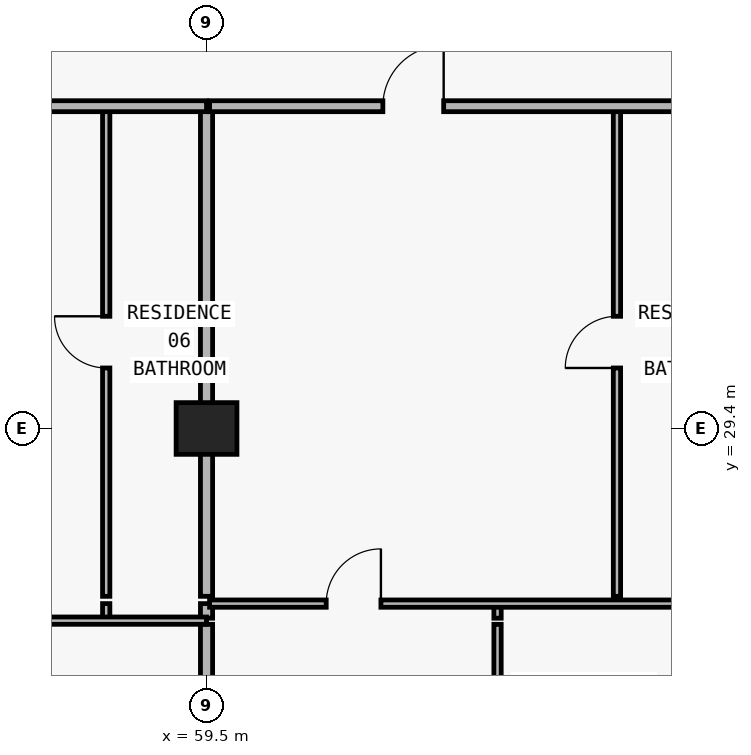
"""IFC4 building model, lengths in metres.
Left out: names, types, materials, properties, quantities, classifications, styles, units other than length and angle.
Written with IfcOpenShell. Run it as: python <this file> out.ifc"""

import sys

from ifc_helpers import new_model, si_unit, direction, frame, frame_2d, origin, origin_2d, place, context, subcontext, project, spatial, rectangle, extrude, element, fill, save


model = new_model("IFC4")
c1 = context("Model", 3, precision=1e-05, world=origin(), true_north=direction((0.0, 1.0)))
c2 = subcontext(c1, "Body", "Model", "MODEL_VIEW")
j1 = project(units=[si_unit("LENGTHUNIT", "METRE"), si_unit("PLANEANGLEUNIT", "RADIAN")], contexts=[c1])
p1 = place(None, origin())
s1 = spatial("IfcSite", under=j1, at=p1, CompositionType="ELEMENT")
p2 = place(p1, origin())
s2 = spatial("IfcBuilding", under=s1, at=p2, CompositionType="ELEMENT")
p3 = place(p2, frame((0.0, 0.0, 122.4)))
s3 = spatial("IfcBuildingStorey", under=s2, at=p3, CompositionType="ELEMENT", Elevation=122.4)
p4 = place(p3, frame((59.5, 29.4, 0.0), z_axis=(0.0, 0.0, 1.0), x_axis=(1.0, 0.0, 0.0)))
e1 = element("IfcColumn", 1, at=p4, inside=s3, PredefinedType="COLUMN", context=c2, shape_type="SweptSolid", body=[
    extrude(rectangle(XDim=1.0, YDim=0.85, at=origin_2d()), origin(), (0.0, 0.0, 1.0), 3.05),
])
p5 = place(p3, frame((57.85, 26.28, 0.0), z_axis=(0.0, 0.0, 1.0), x_axis=(0.0, 1.0, 0.0)))
e2 = element("IfcWall", 2, at=p5, inside=s3, PredefinedType="PARTITIONING", context=c2, shape_type="SweptSolid", body=[
    extrude(rectangle(XDim=0.24, YDim=0.12, at=frame_2d((0.12, 0.0))), origin(), (0.0, 0.0, 1.0), 3.05),
])
p6 = place(p3, frame((57.85, 26.64, 0.0), z_axis=(0.0, 0.0, 1.0), x_axis=(0.0, 1.0, 0.0)))
e3 = element("IfcWall", 3, at=p6, inside=s3, PredefinedType="PARTITIONING", context=c2, shape_type="SweptSolid", body=[
    extrude(rectangle(XDim=8.06, YDim=0.12, at=frame_2d((4.03, 0.0))), origin(), (0.0, 0.0, 1.0), 3.05),
])
p7 = place(p6, frame((3.755, 0.0, 0.0)))
e4 = element("IfcOpeningElement", 4, at=p7, cuts=e3, PredefinedType="OPENING", context=c2, shape_type="SweptSolid", body=[
    extrude(rectangle(XDim=0.85, YDim=2.1, at=frame_2d((0.425, 1.05))), frame((0.0, 0.07, 0.0), z_axis=(0.0, -1.0, 0.0), x_axis=(1.0, 0.0, 0.0)), (0.0, 0.0, 1.0), 0.14),
])
p8 = place(p3, frame((59.5, 21.49, 0.0), z_axis=(0.0, 0.0, 1.0), x_axis=(0.0, 1.0, 0.0)))
e5 = element("IfcWall", 5, at=p8, inside=s3, PredefinedType="PARTITIONING", context=c2, shape_type="SweptSolid", body=[
    extrude(rectangle(XDim=4.69, YDim=0.2, at=frame_2d((2.345, 0.0))), origin(), (0.0, 0.0, 1.0), 2.174),
])
p9 = place(p3, frame((59.5, 26.28, 0.0), z_axis=(0.0, 0.0, 1.0), x_axis=(0.0, 1.0, 0.0)))
e6 = element("IfcWall", 6, at=p9, inside=s3, PredefinedType="PARTITIONING", context=c2, shape_type="SweptSolid", body=[
    extrude(rectangle(XDim=0.24, YDim=0.2, at=frame_2d((0.12, 0.0))), origin(), (0.0, 0.0, 1.0), 2.174),
])
p10 = place(p3, frame((59.5, 26.64, 0.0), z_axis=(0.0, 0.0, 1.0), x_axis=(0.0, 1.0, 0.0)))
e7 = element("IfcWall", 7, at=p10, inside=s3, PredefinedType="PARTITIONING", context=c2, shape_type="SweptSolid", body=[
    extrude(rectangle(XDim=8.06, YDim=0.2, at=frame_2d((4.03, 0.0))), origin(), (0.0, 0.0, 1.0), 2.174),
])
p11 = place(p3, frame((64.286, 21.49, 0.0), z_axis=(0.0, 0.0, 1.0), x_axis=(0.0, 1.0, 0.0)))
e8 = element("IfcWall", 8, at=p11, inside=s3, PredefinedType="PARTITIONING", context=c2, shape_type="SweptSolid", body=[
    extrude(rectangle(XDim=4.69, YDim=0.12, at=frame_2d((2.345, 0.0))), origin(), (0.0, 0.0, 1.0), 3.05),
])
p12 = place(p11, frame((1.895, 0.0, 0.0)))
e9 = element("IfcOpeningElement", 9, at=p12, cuts=e8, PredefinedType="OPENING", context=c2, shape_type="SweptSolid", body=[
    extrude(rectangle(XDim=0.9, YDim=2.15, at=frame_2d((0.45, 1.075))), frame((0.0, 0.07, 0.0), z_axis=(0.0, -1.0, 0.0), x_axis=(1.0, 0.0, 0.0)), (0.0, 0.0, 1.0), 0.14),
])
p13 = place(p3, frame((64.286, 26.28, 0.0), z_axis=(0.0, 0.0, 1.0), x_axis=(0.0, 1.0, 0.0)))
e10 = element("IfcWall", 10, at=p13, inside=s3, PredefinedType="PARTITIONING", context=c2, shape_type="SweptSolid", body=[
    extrude(rectangle(XDim=0.24, YDim=0.12, at=frame_2d((0.12, 0.0))), origin(), (0.0, 0.0, 1.0), 3.05),
])
p14 = place(p3, frame((66.25, 26.64, 0.0), z_axis=(0.0, 0.0, 1.0), x_axis=(0.0, 1.0, 0.0)))
e11 = element("IfcWall", 11, at=p14, inside=s3, PredefinedType="PARTITIONING", context=c2, shape_type="SweptSolid", body=[
    extrude(rectangle(XDim=8.06, YDim=0.12, at=frame_2d((4.03, 0.0))), origin(), (0.0, 0.0, 1.0), 3.05),
])
p15 = place(p14, frame((3.755, 0.0, 0.0)))
e12 = element("IfcOpeningElement", 12, at=p15, cuts=e11, PredefinedType="OPENING", context=c2, shape_type="SweptSolid", body=[
    extrude(rectangle(XDim=0.85, YDim=2.1, at=frame_2d((0.425, 1.05))), frame((0.0, 0.07, 0.0), z_axis=(0.0, -1.0, 0.0), x_axis=(1.0, 0.0, 0.0)), (0.0, 0.0, 1.0), 0.14),
])
p16 = place(p3, frame((51.32, 26.24, 0.0), z_axis=(0.0, 0.0, 1.0), x_axis=(1.0, 0.0, 0.0)))
e13 = element("IfcWall", 13, at=p16, inside=s3, PredefinedType="PARTITIONING", context=c2, shape_type="SweptSolid", body=[
    extrude(rectangle(XDim=8.18, YDim=0.12, at=frame_2d((4.09, 0.0))), origin(), (0.0, 0.0, 1.0), 3.05),
])
p17 = place(p16, frame((1.708, 0.0, 0.0)))
e14 = element("IfcOpeningElement", 14, at=p17, cuts=e13, PredefinedType="OPENING", context=c2, shape_type="SweptSolid", body=[
    extrude(rectangle(XDim=0.9, YDim=2.15, at=frame_2d((0.45, 1.075))), frame((0.0, 0.07, 0.0), z_axis=(0.0, -1.0, 0.0), x_axis=(1.0, 0.0, 0.0)), (0.0, 0.0, 1.0), 0.14),
])
p18 = place(p3, frame((59.55, 26.52, 0.0), z_axis=(0.0, 0.0, 1.0), x_axis=(1.0, 0.0, 0.0)))
e15 = element("IfcWall", 15, at=p18, inside=s3, PredefinedType="PARTITIONING", context=c2, shape_type="SweptSolid", body=[
    extrude(rectangle(XDim=8.35, YDim=0.12, at=frame_2d((4.175, 0.0))), origin(), (0.0, 0.0, 1.0), 3.05),
])
p19 = place(p18, frame((1.918, 0.0, 0.0)))
e16 = element("IfcOpeningElement", 16, at=p19, cuts=e15, PredefinedType="OPENING", context=c2, shape_type="SweptSolid", body=[
    extrude(rectangle(XDim=0.9, YDim=2.15, at=frame_2d((0.45, 1.075))), frame((0.0, 0.07, 0.0), z_axis=(0.0, -1.0, 0.0), x_axis=(1.0, 0.0, 0.0)), (0.0, 0.0, 1.0), 0.14),
])
p20 = place(p3, frame((18.3, 34.7, 0.0), z_axis=(0.0, 0.0, 1.0), x_axis=(1.0, 0.0, 0.0)))
e17 = element("IfcWall", 17, at=p20, inside=s3, PredefinedType="PARTITIONING", context=c2, shape_type="SweptSolid", body=[
    extrude(rectangle(XDim=41.2, YDim=0.18, at=frame_2d((20.6, 0.0))), origin(), (0.0, 0.0, 1.0), 3.05),
])
p21 = place(p20, frame((2.875, 0.0, 0.0)))
e18 = element("IfcOpeningElement", 18, at=p21, cuts=e17, PredefinedType="OPENING", context=c2, shape_type="SweptSolid", body=[
    extrude(rectangle(XDim=1.0, YDim=2.2, at=frame_2d((0.5, 1.1))), frame((0.0, 0.1, 0.0), z_axis=(0.0, -1.0, 0.0), x_axis=(1.0, 0.0, 0.0)), (0.0, 0.0, 1.0), 0.2),
])
p22 = place(p20, frame((11.275, 0.0, 0.0)))
e19 = element("IfcOpeningElement", 19, at=p22, cuts=e17, PredefinedType="OPENING", context=c2, shape_type="SweptSolid", body=[
    extrude(rectangle(XDim=1.0, YDim=2.2, at=frame_2d((0.5, 1.1))), frame((0.0, 0.1, 0.0), z_axis=(0.0, -1.0, 0.0), x_axis=(1.0, 0.0, 0.0)), (0.0, 0.0, 1.0), 0.2),
])
p23 = place(p20, frame((19.275, 0.0, 0.0)))
e20 = element("IfcOpeningElement", 20, at=p23, cuts=e17, PredefinedType="OPENING", context=c2, shape_type="SweptSolid", body=[
    extrude(rectangle(XDim=1.0, YDim=2.2, at=frame_2d((0.5, 1.1))), frame((0.0, 0.1, 0.0), z_axis=(0.0, -1.0, 0.0), x_axis=(1.0, 0.0, 0.0)), (0.0, 0.0, 1.0), 0.2),
])
p24 = place(p20, frame((27.275, 0.0, 0.0)))
e21 = element("IfcOpeningElement", 21, at=p24, cuts=e17, PredefinedType="OPENING", context=c2, shape_type="SweptSolid", body=[
    extrude(rectangle(XDim=1.0, YDim=2.2, at=frame_2d((0.5, 1.1))), frame((0.0, 0.1, 0.0), z_axis=(0.0, -1.0, 0.0), x_axis=(1.0, 0.0, 0.0)), (0.0, 0.0, 1.0), 0.2),
])
p25 = place(p20, frame((35.675, 0.0, 0.0)))
e22 = element("IfcOpeningElement", 22, at=p25, cuts=e17, PredefinedType="OPENING", context=c2, shape_type="SweptSolid", body=[
    extrude(rectangle(XDim=1.0, YDim=2.2, at=frame_2d((0.5, 1.1))), frame((0.0, 0.1, 0.0), z_axis=(0.0, -1.0, 0.0), x_axis=(1.0, 0.0, 0.0)), (0.0, 0.0, 1.0), 0.2),
])
p26 = place(p3, frame((59.55, 34.7, 0.0), z_axis=(0.0, 0.0, 1.0), x_axis=(1.0, 0.0, 0.0)))
e23 = element("IfcWall", 23, at=p26, inside=s3, PredefinedType="PARTITIONING", context=c2, shape_type="SweptSolid", body=[
    extrude(rectangle(XDim=10.55, YDim=0.18, at=frame_2d((5.275, 0.0))), origin(), (0.0, 0.0, 1.0), 3.05),
])
p27 = place(p26, frame((2.85, 0.0, 0.0)))
e24 = element("IfcOpeningElement", 24, at=p27, cuts=e23, PredefinedType="OPENING", context=c2, shape_type="SweptSolid", body=[
    extrude(rectangle(XDim=1.0, YDim=2.2, at=frame_2d((0.5, 1.1))), frame((0.0, 0.1, 0.0), z_axis=(0.0, -1.0, 0.0), x_axis=(1.0, 0.0, 0.0)), (0.0, 0.0, 1.0), 0.2),
])
p28 = place(p7, origin())
e25 = element("IfcDoor", 25, at=p28, inside=s3, OperationType="SINGLE_SWING_RIGHT", PredefinedType="DOOR", context=c2, shape_type="SweptSolid", body=[
    extrude(rectangle(XDim=0.85, YDim=2.1, at=frame_2d((0.425, 1.05))), frame((0.0, 0.025, 0.0), z_axis=(0.0, -1.0, 0.0), x_axis=(1.0, 0.0, 0.0)), (0.0, 0.0, 1.0), 0.05),
])
fill(e4, e25)
p29 = place(p27, origin())
e26 = element("IfcDoor", 26, at=p29, inside=s3, OperationType="SINGLE_SWING_RIGHT", PredefinedType="DOOR", context=c2, shape_type="SweptSolid", body=[
    extrude(rectangle(XDim=1.0, YDim=2.2, at=frame_2d((0.5, 1.1))), frame((0.0, 0.025, 0.0), z_axis=(0.0, -1.0, 0.0), x_axis=(1.0, 0.0, 0.0)), (0.0, 0.0, 1.0), 0.05),
])
fill(e24, e26)
p30 = place(p15, origin())
e27 = element("IfcDoor", 27, at=p30, inside=s3, OperationType="SINGLE_SWING_LEFT", PredefinedType="DOOR", context=c2, shape_type="SweptSolid", body=[
    extrude(rectangle(XDim=0.85, YDim=2.1, at=frame_2d((0.425, 1.05))), frame((0.0, 0.025, 0.0), z_axis=(0.0, -1.0, 0.0), x_axis=(1.0, 0.0, 0.0)), (0.0, 0.0, 1.0), 0.05),
])
fill(e12, e27)
p31 = place(p19, origin())
e28 = element("IfcDoor", 28, at=p31, inside=s3, OperationType="SINGLE_SWING_RIGHT", PredefinedType="DOOR", context=c2, shape_type="SweptSolid", body=[
    extrude(rectangle(XDim=0.9, YDim=2.15, at=frame_2d((0.45, 1.075))), frame((0.0, 0.025, 0.0), z_axis=(0.0, -1.0, 0.0), x_axis=(1.0, 0.0, 0.0)), (0.0, 0.0, 1.0), 0.05),
])
fill(e16, e28)
save(model, sys.argv[1])
